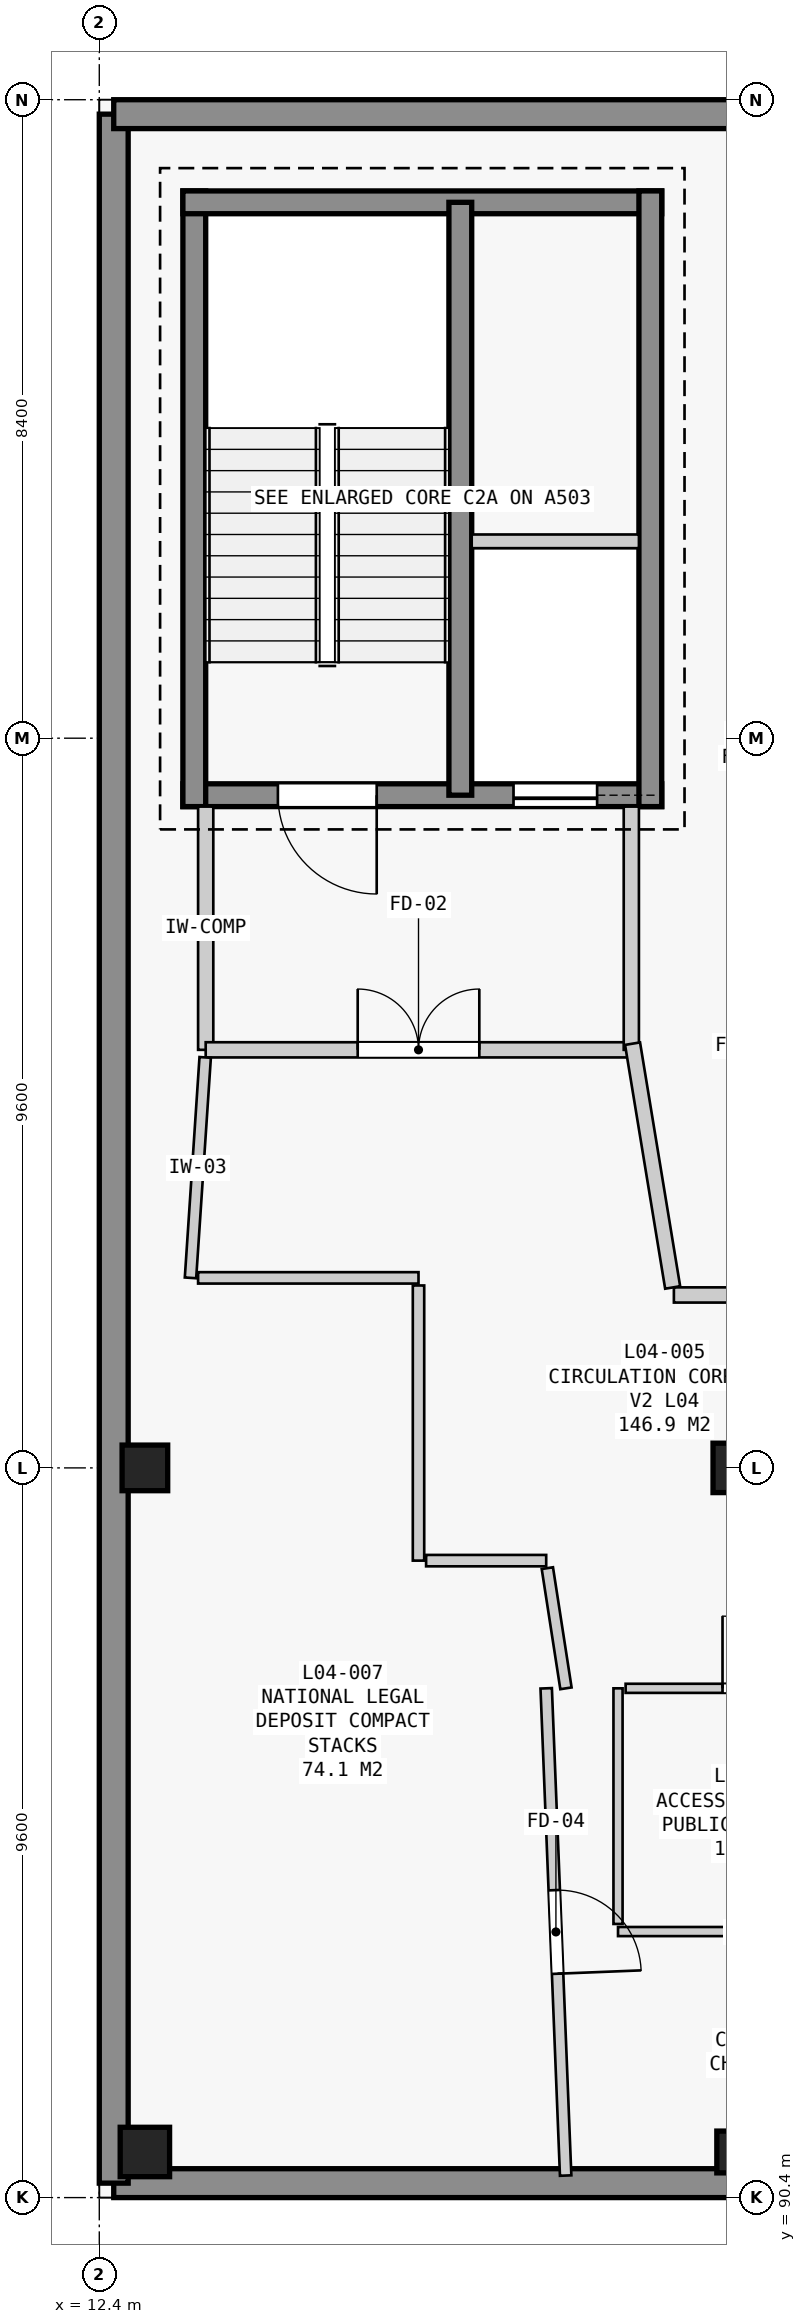
"""IFC4 building model, lengths in metres.
Left out: names, types, materials, properties, quantities, classifications, styles, units other than length and angle.
Written with IfcOpenShell. Run it as: python <this file> out.ifc"""

import sys

from ifc_helpers import new_model, si_unit, direction, frame, frame_2d, origin, origin_2d, place, context, subcontext, project, spatial, rectangle, extrude, element, fill, save


model = new_model("IFC4")
c1 = context("Model", 3, precision=1e-05, world=origin(), true_north=direction((0.0, 1.0)))
c2 = subcontext(c1, "Body", "Model", "MODEL_VIEW")
j1 = project(units=[si_unit("LENGTHUNIT", "METRE"), si_unit("PLANEANGLEUNIT", "RADIAN")], contexts=[c1])
p1 = place(None, origin())
s1 = spatial("IfcSite", under=j1, at=p1, CompositionType="ELEMENT")
p2 = place(p1, origin())
s2 = spatial("IfcBuilding", under=s1, at=p2, CompositionType="ELEMENT")
p3 = place(p2, frame((0.0, 0.0, 18.3)))
s3 = spatial("IfcBuildingStorey", under=s2, at=p3, CompositionType="ELEMENT", Elevation=18.3)
p4 = place(p3, frame((13.0, 91.0, 0.0), z_axis=(0.0, 0.0, 1.0), x_axis=(1.0, 0.0, 0.0)))
e1 = element("IfcColumn", 1, at=p4, inside=s3, PredefinedType="COLUMN", context=c2, shape_type="SweptSolid", body=[
    extrude(rectangle(XDim=0.65, YDim=0.65, at=origin_2d()), origin(), (0.0, 0.0, 1.0), 4.2),
])
p5 = place(p3, frame((13.0, 100.0, 0.0), z_axis=(0.0, 0.0, 1.0), x_axis=(1.0, 0.0, 0.0)))
e2 = element("IfcColumn", 2, at=p5, inside=s3, PredefinedType="COLUMN", context=c2, shape_type="SweptSolid", body=[
    extrude(rectangle(XDim=0.6, YDim=0.6, at=origin_2d()), origin(), (0.0, 0.0, 1.0), 4.2),
])
p6 = place(p3, frame((20.8, 91.0, 0.0), z_axis=(0.0, 0.0, 1.0), x_axis=(1.0, 0.0, 0.0)))
e3 = element("IfcColumn", 3, at=p6, inside=s3, PredefinedType="COLUMN", context=c2, shape_type="SweptSolid", body=[
    extrude(rectangle(XDim=0.55, YDim=0.55, at=origin_2d()), origin(), (0.0, 0.0, 1.0), 4.2),
])
p7 = place(p3, frame((20.8, 100.0, 0.0), z_axis=(0.0, 0.0, 1.0), x_axis=(1.0, 0.0, 0.0)))
e4 = element("IfcColumn", 4, at=p7, inside=s3, PredefinedType="COLUMN", context=c2, shape_type="SweptSolid", body=[
    extrude(rectangle(XDim=0.65, YDim=0.65, at=origin_2d()), origin(), (0.0, 0.0, 1.0), 4.2),
])
p8 = place(p3, frame((36.01, 90.59, 0.0), z_axis=(0.0, 0.0, 1.0), x_axis=(-1.0, 0.0, 0.0)))
e5 = element("IfcWall", 5, at=p8, inside=s3, PredefinedType="STANDARD", context=c2, shape_type="SweptSolid", body=[
    extrude(rectangle(XDim=23.42, YDim=0.38, at=frame_2d((11.71, 0.0))), origin(), (0.0, 0.0, 1.0), 3.94),
])
p9 = place(p3, frame((12.59, 90.59, 0.0), z_axis=(0.0, 0.0, 1.0), x_axis=(0.0, 1.0, 0.0)))
e6 = element("IfcWall", 6, at=p9, inside=s3, PredefinedType="STANDARD", context=c2, shape_type="SweptSolid", body=[
    extrude(rectangle(XDim=27.22, YDim=0.38, at=frame_2d((13.61, 0.0))), origin(), (0.0, 0.0, 1.0), 3.88),
])
p10 = place(p3, frame((12.59, 117.81, 0.0), z_axis=(0.0, 0.0, 1.0), x_axis=(1.0, 0.0, 0.0)))
e7 = element("IfcWall", 7, at=p10, inside=s3, PredefinedType="STANDARD", context=c2, shape_type="SweptSolid", body=[
    extrude(rectangle(XDim=23.42, YDim=0.38, at=frame_2d((11.71, 0.0))), origin(), (0.0, 0.0, 1.0), 3.88),
])
p11 = place(p3, frame((19.8, 108.85, 0.0), z_axis=(0.0, 0.0, 1.0), x_axis=(-1.0, 0.0, 0.0)))
e8 = element("IfcWall", 8, at=p11, inside=s3, PredefinedType="SHEAR", context=c2, shape_type="SweptSolid", body=[
    extrude(rectangle(XDim=6.3, YDim=0.3, at=frame_2d((3.15, 0.0))), origin(), (0.0, 0.0, 1.0), 3.88),
])
p12 = place(p11, frame((3.75, 0.0, 0.0)))
e9 = element("IfcOpeningElement", 9, at=p12, cuts=e8, PredefinedType="OPENING", context=c2, shape_type="SweptSolid", body=[
    extrude(rectangle(XDim=1.3, YDim=2.2, at=frame_2d((0.65, 1.1))), frame((0.0, 0.16, 0.0), z_axis=(0.0, -1.0, 0.0), x_axis=(1.0, 0.0, 0.0)), (0.0, 0.0, 1.0), 0.32),
])
p13 = place(p11, frame((0.85, 0.0, 0.0)))
e10 = element("IfcOpeningElement", 10, at=p13, cuts=e8, PredefinedType="OPENING", context=c2, shape_type="SweptSolid", body=[
    extrude(rectangle(XDim=1.1, YDim=2.15, at=frame_2d((0.55, 1.075))), frame((0.0, 0.16, 0.0), z_axis=(0.0, -1.0, 0.0), x_axis=(1.0, 0.0, 0.0)), (0.0, 0.0, 1.0), 0.32),
])
p14 = place(p3, frame((13.65, 108.7, 0.0), z_axis=(0.0, 0.0, 1.0), x_axis=(0.0, 1.0, 0.0)))
e11 = element("IfcWall", 11, at=p14, inside=s3, PredefinedType="SHEAR", context=c2, shape_type="SweptSolid", body=[
    extrude(rectangle(XDim=8.1, YDim=0.3, at=frame_2d((4.05, 0.0))), origin(), (0.0, 0.0, 1.0), 3.88),
])
p15 = place(p3, frame((13.5, 116.65, 0.0), z_axis=(0.0, 0.0, 1.0), x_axis=(1.0, 0.0, 0.0)))
e12 = element("IfcWall", 12, at=p15, inside=s3, PredefinedType="SHEAR", context=c2, shape_type="SweptSolid", body=[
    extrude(rectangle(XDim=6.3, YDim=0.3, at=frame_2d((3.15, 0.0))), origin(), (0.0, 0.0, 1.0), 3.88),
])
p16 = place(p3, frame((19.65, 116.8, 0.0), z_axis=(0.0, 0.0, 1.0), x_axis=(0.0, -1.0, 0.0)))
e13 = element("IfcWall", 13, at=p16, inside=s3, PredefinedType="SHEAR", context=c2, shape_type="SweptSolid", body=[
    extrude(rectangle(XDim=8.1, YDim=0.3, at=frame_2d((4.05, 0.0))), origin(), (0.0, 0.0, 1.0), 3.88),
])
p17 = place(p3, frame((17.15, 108.85, 0.0), z_axis=(0.0, 0.0, 1.0), x_axis=(0.0, 1.0, 0.0)))
e14 = element("IfcWall", 14, at=p17, inside=s3, PredefinedType="SHEAR", context=c2, shape_type="SweptSolid", body=[
    extrude(rectangle(XDim=7.8, YDim=0.3, at=frame_2d((3.9, 0.0))), origin(), (0.0, 0.0, 1.0), 3.88),
])
p18 = place(p3, frame((17.3, 112.19, 0.0), z_axis=(0.0, 0.0, 1.0), x_axis=(1.0, 0.0, 0.0)))
e15 = element("IfcWall", 15, at=p18, inside=s3, PredefinedType="PARTITIONING", context=c2, shape_type="SweptSolid", body=[
    extrude(rectangle(XDim=2.2, YDim=0.18, at=frame_2d((1.1, 0.0))), origin(), (0.0, 0.0, 1.0), 3.88),
])
p19 = place(p3, frame((13.8, 108.7, 0.0), z_axis=(0.0, 0.0, 1.0), x_axis=(0.0, -1.0, 0.0)))
e16 = element("IfcWall", 16, at=p19, inside=s3, PredefinedType="STANDARD", context=c2, shape_type="SweptSolid", body=[
    extrude(rectangle(XDim=3.2, YDim=0.2, at=frame_2d((1.6, 0.0))), origin(), (0.0, 0.0, 1.0), 3.88),
])
p20 = place(p3, frame((13.8, 105.5, 0.0), z_axis=(0.0, 0.0, 1.0), x_axis=(1.0, 0.0, 0.0)))
e17 = element("IfcWall", 17, at=p20, inside=s3, PredefinedType="STANDARD", context=c2, shape_type="SweptSolid", body=[
    extrude(rectangle(XDim=5.6, YDim=0.2, at=frame_2d((2.8, 0.0))), origin(), (0.0, 0.0, 1.0), 3.88),
])
p21 = place(p20, frame((2.0, 0.0, 0.0)))
e18 = element("IfcOpeningElement", 18, at=p21, cuts=e17, PredefinedType="OPENING", context=c2, shape_type="SweptSolid", body=[
    extrude(rectangle(XDim=1.6, YDim=2.2, at=frame_2d((0.8, 1.1))), frame((0.0, 0.11, 0.0), z_axis=(0.0, -1.0, 0.0), x_axis=(1.0, 0.0, 0.0)), (0.0, 0.0, 1.0), 0.22),
])
p22 = place(p3, frame((19.4, 105.5, 0.0), z_axis=(0.0, 0.0, 1.0), x_axis=(0.0, 1.0, 0.0)))
e19 = element("IfcWall", 19, at=p22, inside=s3, PredefinedType="STANDARD", context=c2, shape_type="SweptSolid", body=[
    extrude(rectangle(XDim=3.2, YDim=0.2, at=frame_2d((1.6, 0.0))), origin(), (0.0, 0.0, 1.0), 3.88),
])
p23 = place(p3, frame((22.825, 93.9, 0.0), z_axis=(0.0, 0.0, 1.0), x_axis=(-1.0, 0.0, 0.0)))
e20 = element("IfcWall", 20, at=p23, inside=s3, PredefinedType="PARTITIONING", context=c2, shape_type="SweptSolid", body=[
    extrude(rectangle(XDim=3.6, YDim=0.12, at=frame_2d((1.8, 0.0))), origin(), (0.0, 0.0, 1.0), 3.07),
])
p24 = place(p3, frame((19.225, 94.0, 0.0), z_axis=(0.0, 0.0, 1.0), x_axis=(0.0, 1.0, 0.0)))
e21 = element("IfcWall", 21, at=p24, inside=s3, PredefinedType="PARTITIONING", context=c2, shape_type="SweptSolid", body=[
    extrude(rectangle(XDim=3.1, YDim=0.12, at=frame_2d((1.55, 0.0))), origin(), (0.0, 0.0, 1.0), 3.88),
])
p25 = place(p3, frame((19.325, 97.1, 0.0), z_axis=(0.0, 0.0, 1.0), x_axis=(1.0, 0.0, 0.0)))
e22 = element("IfcWall", 22, at=p25, inside=s3, PredefinedType="PARTITIONING", context=c2, shape_type="SweptSolid", body=[
    extrude(rectangle(XDim=3.5, YDim=0.12, at=frame_2d((1.75, 0.0))), origin(), (0.0, 0.0, 1.0), 3.07),
])
p26 = place(p25, frame((1.275, 0.0, 0.0)))
e23 = element("IfcOpeningElement", 23, at=p26, cuts=e22, PredefinedType="OPENING", context=c2, shape_type="SweptSolid", body=[
    extrude(rectangle(XDim=0.95, YDim=2.15, at=frame_2d((0.475, 1.075))), frame((0.0, 0.07, 0.0), z_axis=(0.0, -1.0, 0.0), x_axis=(1.0, 0.0, 0.0)), (0.0, 0.0, 1.0), 0.14),
])
p27 = place(p3, frame((13.793, 105.4, 0.0), z_axis=(0.0, 0.0, 1.0), x_axis=(-0.066440960793, -0.997790358106, 0.0)))
e24 = element("IfcWall", 24, at=p27, inside=s3, PredefinedType="PARTITIONING", context=c2, shape_type="SweptSolid", body=[
    extrude(rectangle(XDim=2.906, YDim=0.15, at=frame_2d((1.453, 0.0))), origin(), (0.0, 0.0, 1.0), 3.88),
])
p28 = place(p3, frame((13.7, 102.5, 0.0), z_axis=(0.0, 0.0, 1.0), x_axis=(1.0, 0.0, 0.0)))
e25 = element("IfcWall", 25, at=p28, inside=s3, PredefinedType="PARTITIONING", context=c2, shape_type="SweptSolid", body=[
    extrude(rectangle(XDim=2.9, YDim=0.15, at=frame_2d((1.45, 0.0))), origin(), (0.0, 0.0, 1.0), 3.88),
])
p29 = place(p3, frame((16.6, 102.4, 0.0), z_axis=(0.0, 0.0, 1.0), x_axis=(0.0, -1.0, 0.0)))
e26 = element("IfcWall", 26, at=p29, inside=s3, PredefinedType="PARTITIONING", context=c2, shape_type="SweptSolid", body=[
    extrude(rectangle(XDim=3.62, YDim=0.15, at=frame_2d((1.81, 0.0))), origin(), (0.0, 0.0, 1.0), 3.01),
])
p30 = place(p3, frame((16.7, 98.78, 0.0), z_axis=(0.0, 0.0, 1.0), x_axis=(1.0, 0.0, 0.0)))
e27 = element("IfcWall", 27, at=p30, inside=s3, PredefinedType="PARTITIONING", context=c2, shape_type="SweptSolid", body=[
    extrude(rectangle(XDim=1.58, YDim=0.15, at=frame_2d((0.79, 0.0))), origin(), (0.0, 0.0, 1.0), 3.4),
])
p31 = place(p3, frame((18.295, 98.681, 0.0), z_axis=(0.0, 0.0, 1.0), x_axis=(0.152905692797, -0.988240784986, 0.0)))
e28 = element("IfcWall", 28, at=p31, inside=s3, PredefinedType="PARTITIONING", context=c2, shape_type="SweptSolid", body=[
    extrude(rectangle(XDim=1.6, YDim=0.15, at=frame_2d((0.8, 0.0))), origin(), (0.0, 0.0, 1.0), 3.88),
])
p32 = place(p3, frame((18.28, 97.1, 0.0), z_axis=(0.0, 0.0, 1.0), x_axis=(0.039882928426, -0.999204359488, 0.0)))
e29 = element("IfcWall", 29, at=p32, inside=s3, PredefinedType="PARTITIONING", context=c2, shape_type="SweptSolid", body=[
    extrude(rectangle(XDim=6.415, YDim=0.15, at=frame_2d((3.208, 0.0))), origin(), (0.0, 0.0, 1.0), 3.17),
])
p33 = place(p32, frame((2.658, 0.0, 0.0)))
e30 = element("IfcOpeningElement", 30, at=p33, cuts=e29, PredefinedType="OPENING", context=c2, shape_type="SweptSolid", body=[
    extrude(rectangle(XDim=1.1, YDim=2.15, at=frame_2d((0.55, 1.075))), frame((0.0, 0.085, 0.0), z_axis=(0.0, -1.0, 0.0), x_axis=(1.0, 0.0, 0.0)), (0.0, 0.0, 1.0), 0.17),
])
p34 = place(p3, frame((22.975, 102.275, 0.0), z_axis=(0.0, 0.0, 1.0), x_axis=(-1.0, 0.0, 0.0)))
e31 = element("IfcWall", 31, at=p34, inside=s3, PredefinedType="STANDARD", context=c2, shape_type="SweptSolid", body=[
    extrude(rectangle(XDim=3.015, YDim=0.2, at=frame_2d((1.508, 0.0))), origin(), (0.0, 0.0, 1.0), 3.88),
])
p35 = place(p3, frame((19.944, 102.374, 0.0), z_axis=(0.0, 0.0, 1.0), x_axis=(-0.162303771926, 0.986740840149, 0.0)))
e32 = element("IfcWall", 32, at=p35, inside=s3, PredefinedType="STANDARD", context=c2, shape_type="SweptSolid", body=[
    extrude(rectangle(XDim=3.251, YDim=0.2, at=frame_2d((1.625, 0.0))), origin(), (0.0, 0.0, 1.0), 3.88),
])
p36 = place(p12, origin())
e33 = element("IfcDoor", 33, at=p36, inside=s3, OperationType="SINGLE_SWING_LEFT", PredefinedType="DOOR", context=c2, shape_type="SweptSolid", body=[
    extrude(rectangle(XDim=1.3, YDim=2.2, at=frame_2d((0.65, 1.1))), frame((0.0, 0.025, 0.0), z_axis=(0.0, -1.0, 0.0), x_axis=(1.0, 0.0, 0.0)), (0.0, 0.0, 1.0), 0.05),
])
fill(e9, e33)
p37 = place(p13, origin())
e34 = element("IfcDoor", 34, at=p37, inside=s3, OperationType="SLIDING_TO_LEFT", PredefinedType="DOOR", context=c2, shape_type="SweptSolid", body=[
    extrude(rectangle(XDim=1.1, YDim=2.15, at=frame_2d((0.55, 1.075))), frame((0.0, 0.025, 0.0), z_axis=(0.0, -1.0, 0.0), x_axis=(1.0, 0.0, 0.0)), (0.0, 0.0, 1.0), 0.05),
])
fill(e10, e34)
p38 = place(p21, origin())
e35 = element("IfcDoor", 35, at=p38, inside=s3, OperationType="DOUBLE_DOOR_SINGLE_SWING", PredefinedType="DOOR", context=c2, shape_type="SweptSolid", body=[
    extrude(rectangle(XDim=1.6, YDim=2.2, at=frame_2d((0.8, 1.1))), frame((0.0, 0.025, 0.0), z_axis=(0.0, -1.0, 0.0), x_axis=(1.0, 0.0, 0.0)), (0.0, 0.0, 1.0), 0.05),
])
fill(e18, e35)
p39 = place(p26, origin())
e36 = element("IfcDoor", 36, at=p39, inside=s3, OperationType="SINGLE_SWING_LEFT", PredefinedType="DOOR", context=c2, shape_type="SweptSolid", body=[
    extrude(rectangle(XDim=0.95, YDim=2.15, at=frame_2d((0.475, 1.075))), frame((0.0, 0.025, 0.0), z_axis=(0.0, -1.0, 0.0), x_axis=(1.0, 0.0, 0.0)), (0.0, 0.0, 1.0), 0.05),
])
fill(e23, e36)
p40 = place(p33, origin())
e37 = element("IfcDoor", 37, at=p40, inside=s3, OperationType="SINGLE_SWING_RIGHT", PredefinedType="DOOR", context=c2, shape_type="SweptSolid", body=[
    extrude(rectangle(XDim=1.1, YDim=2.15, at=frame_2d((0.55, 1.075))), frame((0.0, 0.025, 0.0), z_axis=(0.0, -1.0, 0.0), x_axis=(1.0, 0.0, 0.0)), (0.0, 0.0, 1.0), 0.05),
])
fill(e30, e37)
save(model, sys.argv[1])
